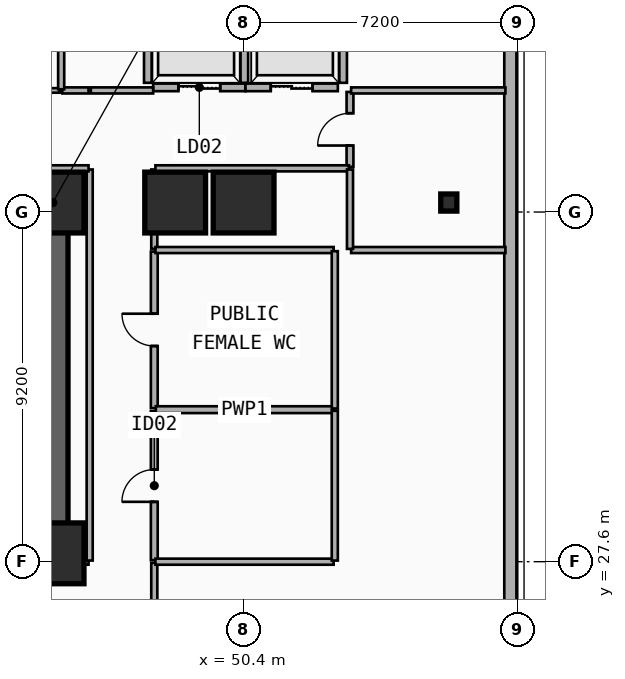
"""IFC4 building model, lengths in metres.
Left out: names, types, materials, properties, quantities, classifications, styles, units other than length and angle.
Written with IfcOpenShell. Run it as: python <this file> out.ifc"""

import sys

from ifc_helpers import new_model, si_unit, direction, frame, frame_2d, origin, origin_2d, place, context, subcontext, project, spatial, rectangle, i_section, extrude, element, fill, save


model = new_model("IFC4")
c1 = context("Model", 3, precision=1e-05, world=origin(), true_north=direction((0.0, 1.0)))
c2 = subcontext(c1, "Body", "Model", "MODEL_VIEW")
j1 = project(units=[si_unit("LENGTHUNIT", "METRE"), si_unit("PLANEANGLEUNIT", "RADIAN")], contexts=[c1])
p1 = place(None, origin())
s1 = spatial("IfcSite", under=j1, at=p1, CompositionType="ELEMENT")
p2 = place(p1, origin())
s2 = spatial("IfcBuilding", under=s1, at=p2, CompositionType="ELEMENT")
p3 = place(p2, frame((0.0, 0.0, 5.4)))
s3 = spatial("IfcBuildingStorey", under=s2, at=p3, CompositionType="ELEMENT", Elevation=5.4)
p4 = place(p3, frame((12.15, 37.05, 0.0), z_axis=(0.0, 0.0, 1.0), x_axis=(1.0, 0.0, 0.0)))
e1 = element("IfcWall", 1, at=p4, inside=s3, PredefinedType="SHEAR", context=c2, shape_type="SweptSolid", body=[
    extrude(rectangle(XDim=33.23, YDim=0.8, at=frame_2d((16.615, 0.0))), origin(), (0.0, 0.0, 1.0), 5.0),
])
p5 = place(p3, frame((45.38, 27.82, 0.0), z_axis=(0.0, 0.0, 1.0), x_axis=(-1.0, 0.0, 0.0)))
e2 = element("IfcWall", 2, at=p5, inside=s3, PredefinedType="SHEAR", context=c2, shape_type="SweptSolid", body=[
    extrude(rectangle(XDim=12.23, YDim=0.8, at=frame_2d((6.115, 0.0))), origin(), (0.0, 0.0, 1.0), 5.0),
])
p6 = place(p5, frame((9.93, 0.0, 0.0)))
e3 = element("IfcOpeningElement", 3, at=p6, cuts=e2, PredefinedType="OPENING", context=c2, shape_type="SweptSolid", body=[
    extrude(rectangle(XDim=1.1, YDim=2.15, at=frame_2d((0.55, 1.075))), frame((0.0, 0.41, 0.0), z_axis=(0.0, -1.0, 0.0), x_axis=(1.0, 0.0, 0.0)), (0.0, 0.0, 1.0), 0.82),
])
p7 = place(p5, frame((6.23, 0.0, 0.0)))
e4 = element("IfcOpeningElement", 4, at=p7, cuts=e2, PredefinedType="OPENING", context=c2, shape_type="SweptSolid", body=[
    extrude(rectangle(XDim=1.1, YDim=2.15, at=frame_2d((0.55, 1.075))), frame((0.0, 0.41, 0.0), z_axis=(0.0, -1.0, 0.0), x_axis=(1.0, 0.0, 0.0)), (0.0, 0.0, 1.0), 0.82),
])
p8 = place(p3, frame((45.38, 28.22, 0.0), z_axis=(0.0, 0.0, 1.0), x_axis=(0.0, 1.0, 0.0)))
e5 = element("IfcWall", 5, at=p8, inside=s3, PredefinedType="SHEAR", context=c2, shape_type="SweptSolid", body=[
    extrude(rectangle(XDim=8.43, YDim=0.8, at=frame_2d((4.215, 0.0))), origin(), (0.0, 0.0, 1.0), 5.0),
])
for number, where, z_axis, x_axis in (
    (6, (45.4, 27.82, 0.0), (0.0, 0.0, 1.0), (1.0, 0.0, 0.0)),
    (7, (45.4, 37.05, 0.0), (0.0, 0.0, 1.0), (1.0, 0.0, 0.0)),
    (8, (48.6, 37.05, 0.0), (0.0, 0.0, 1.0), (1.0, 0.0, 0.0)),
    (9, (50.4, 37.05, 0.0), (0.0, 0.0, 1.0), (1.0, 0.0, 0.0)),
):
    element("IfcColumn", number, at=place(p3, frame(where, z_axis=z_axis, x_axis=x_axis)), inside=s3, PredefinedType="COLUMN", context=c2, shape_type="SweptSolid", body=[
        extrude(rectangle(XDim=1.6, YDim=1.6, at=origin_2d()), origin(), (0.0, 0.0, 1.0), 5.0),
    ])
p9 = place(p3, frame((55.8, 37.05, 0.0), z_axis=(0.0, 0.0, 1.0), x_axis=(1.0, 0.0, 0.0)))
e10 = element("IfcColumn", 10, at=p9, inside=s3, PredefinedType="COLUMN", context=c2, shape_type="SweptSolid", body=[
    extrude(i_section(OverallWidth=0.424, OverallDepth=0.45, WebThickness=0.041, FlangeThickness=0.065, FilletRadius=0.015, at=origin_2d()), origin(), (0.0, 0.0, 1.0), 5.0),
])
p10 = place(p3, frame((57.42, 41.6, 0.0), z_axis=(0.0, 0.0, 1.0), x_axis=(0.0, -1.0, 0.0)))
e11 = element("IfcWall", 11, at=p10, inside=s3, PredefinedType="SOLIDWALL", context=c2, shape_type="SweptSolid", body=[
    extrude(rectangle(XDim=34.4, YDim=0.32, at=frame_2d((17.2, 0.0))), origin(), (0.0, 0.0, 1.0), 4.7),
])
p11 = place(p10, frame((20.727, 0.0, 0.9)))
e12 = element("IfcOpeningElement", 12, at=p11, cuts=e11, PredefinedType="OPENING", context=c2, shape_type="SweptSolid", body=[
    extrude(rectangle(XDim=2.4, YDim=1.8, at=frame_2d((1.2, 0.9))), frame((0.0, 0.17, 0.0), z_axis=(0.0, -1.0, 0.0), x_axis=(1.0, 0.0, 0.0)), (0.0, 0.0, 1.0), 0.34),
])
p12 = place(p10, frame((27.403, 0.0, 0.9)))
e13 = element("IfcOpeningElement", 13, at=p12, cuts=e11, PredefinedType="OPENING", context=c2, shape_type="SweptSolid", body=[
    extrude(rectangle(XDim=2.4, YDim=1.8, at=frame_2d((1.2, 0.9))), frame((0.0, 0.17, 0.0), z_axis=(0.0, -1.0, 0.0), x_axis=(1.0, 0.0, 0.0)), (0.0, 0.0, 1.0), 0.34),
])
p13 = place(p3, frame((48.02, 40.08, 0.0), z_axis=(0.0, 0.0, 1.0), x_axis=(1.0, 0.0, 0.0)))
e14 = element("IfcWall", 14, at=p13, inside=s3, PredefinedType="PARTITIONING", context=c2, shape_type="SweptSolid", body=[
    extrude(rectangle(XDim=2.43, YDim=0.2, at=frame_2d((1.215, 0.0))), origin(), (0.0, 0.0, 1.0), 4.7),
])
p14 = place(p13, frame((0.665, 0.0, 0.0)))
e15 = element("IfcOpeningElement", 15, at=p14, cuts=e14, PredefinedType="OPENING", context=c2, shape_type="SweptSolid", body=[
    extrude(rectangle(XDim=1.1, YDim=2.15, at=frame_2d((0.55, 1.075))), frame((0.0, 0.11, 0.0), z_axis=(0.0, -1.0, 0.0), x_axis=(1.0, 0.0, 0.0)), (0.0, 0.0, 1.0), 0.22),
])
for number, where, z_axis, x_axis in (
    (16, (47.88, 40.2, 0.0), (0.0, 0.0, 1.0), (0.0, 1.0, 0.0)),
    (17, (50.42, 40.2, 0.0), (0.0, 0.0, 1.0), (0.0, 1.0, 0.0)),
):
    element("IfcWall", number, at=place(p3, frame(where, z_axis=z_axis, x_axis=x_axis)), inside=s3, PredefinedType="PARTITIONING", context=c2, shape_type="SweptSolid", body=[
        extrude(rectangle(XDim=2.6, YDim=0.2, at=frame_2d((1.3, 0.0))), origin(), (0.0, 0.0, 1.0), 4.7),
    ])
p15 = place(p3, frame((50.45, 40.08, 0.0), z_axis=(0.0, 0.0, 1.0), x_axis=(1.0, 0.0, 0.0)))
e18 = element("IfcWall", 18, at=p15, inside=s3, PredefinedType="PARTITIONING", context=c2, shape_type="SweptSolid", body=[
    extrude(rectangle(XDim=2.43, YDim=0.2, at=frame_2d((1.215, 0.0))), origin(), (0.0, 0.0, 1.0), 4.7),
])
p16 = place(p15, frame((0.665, 0.0, 0.0)))
e19 = element("IfcOpeningElement", 19, at=p16, cuts=e18, PredefinedType="OPENING", context=c2, shape_type="SweptSolid", body=[
    extrude(rectangle(XDim=1.1, YDim=2.15, at=frame_2d((0.55, 1.075))), frame((0.0, 0.11, 0.0), z_axis=(0.0, -1.0, 0.0), x_axis=(1.0, 0.0, 0.0)), (0.0, 0.0, 1.0), 0.22),
])
p17 = place(p3, frame((53.02, 40.2, 0.0), z_axis=(0.0, 0.0, 1.0), x_axis=(0.0, 1.0, 0.0)))
e20 = element("IfcWall", 20, at=p17, inside=s3, PredefinedType="PARTITIONING", context=c2, shape_type="SweptSolid", body=[
    extrude(rectangle(XDim=2.6, YDim=0.2, at=frame_2d((1.3, 0.0))), origin(), (0.0, 0.0, 1.0), 4.7),
])
p18 = place(p3, frame((48.05, 27.64, 0.0), z_axis=(0.0, 0.0, 1.0), x_axis=(0.0, 1.0, 0.0)))
e21 = element("IfcWall", 21, at=p18, inside=s3, PredefinedType="PLUMBINGWALL", context=c2, shape_type="SweptSolid", body=[
    extrude(rectangle(XDim=3.92, YDim=0.18, at=frame_2d((1.96, 0.0))), origin(), (0.0, 0.0, 1.0), 4.7),
])
p19 = place(p18, frame((1.535, 0.0, 0.0)))
e22 = element("IfcOpeningElement", 22, at=p19, cuts=e21, PredefinedType="OPENING", context=c2, shape_type="SweptSolid", body=[
    extrude(rectangle(XDim=0.85, YDim=2.1, at=frame_2d((0.425, 1.05))), frame((0.0, 0.1, 0.0), z_axis=(0.0, -1.0, 0.0), x_axis=(1.0, 0.0, 0.0)), (0.0, 0.0, 1.0), 0.2),
])
p20 = place(p3, frame((48.05, 31.64, 0.0), z_axis=(0.0, 0.0, 1.0), x_axis=(0.0, 1.0, 0.0)))
e23 = element("IfcWall", 23, at=p20, inside=s3, PredefinedType="PLUMBINGWALL", context=c2, shape_type="SweptSolid", body=[
    extrude(rectangle(XDim=4.12, YDim=0.18, at=frame_2d((2.06, 0.0))), origin(), (0.0, 0.0, 1.0), 4.7),
])
p21 = place(p20, frame((1.635, 0.0, 0.0)))
e24 = element("IfcOpeningElement", 24, at=p21, cuts=e23, PredefinedType="OPENING", context=c2, shape_type="SweptSolid", body=[
    extrude(rectangle(XDim=0.85, YDim=2.1, at=frame_2d((0.425, 1.05))), frame((0.0, 0.1, 0.0), z_axis=(0.0, -1.0, 0.0), x_axis=(1.0, 0.0, 0.0)), (0.0, 0.0, 1.0), 0.2),
])
p22 = place(p3, frame((12.04, 40.0, 0.0), z_axis=(0.0, 0.0, 1.0), x_axis=(1.0, 0.0, 0.0)))
e25 = element("IfcWall", 25, at=p22, inside=s3, PredefinedType="PARTITIONING", context=c2, shape_type="SweptSolid", body=[
    extrude(rectangle(XDim=33.52, YDim=0.12, at=frame_2d((16.76, 0.0))), origin(), (0.0, 0.0, 1.0), 4.03),
])
p23 = place(p22, frame((16.31, 0.0, 0.0)))
e26 = element("IfcOpeningElement", 26, at=p23, cuts=e25, PredefinedType="OPENING", context=c2, shape_type="SweptSolid", body=[
    extrude(rectangle(XDim=0.9, YDim=2.1, at=frame_2d((0.45, 1.05))), frame((0.0, 0.07, 0.0), z_axis=(0.0, -1.0, 0.0), x_axis=(1.0, 0.0, 0.0)), (0.0, 0.0, 1.0), 0.14),
])
p24 = place(p3, frame((53.2, 37.99, 0.0), z_axis=(0.0, 0.0, 1.0), x_axis=(0.0, 1.0, 0.0)))
e27 = element("IfcWall", 27, at=p24, inside=s3, PredefinedType="PLUMBINGWALL", context=c2, shape_type="SweptSolid", body=[
    extrude(rectangle(XDim=1.97, YDim=0.18, at=frame_2d((0.985, 0.0))), origin(), (0.0, 0.0, 1.0), 4.7),
])
p25 = place(p24, frame((0.56, 0.0, 0.0)))
e28 = element("IfcOpeningElement", 28, at=p25, cuts=e27, PredefinedType="OPENING", context=c2, shape_type="SweptSolid", body=[
    extrude(rectangle(XDim=0.85, YDim=2.1, at=frame_2d((0.425, 1.05))), frame((0.0, 0.1, 0.0), z_axis=(0.0, -1.0, 0.0), x_axis=(1.0, 0.0, 0.0)), (0.0, 0.0, 1.0), 0.2),
])
p26 = place(p3, frame((48.09, 31.6, 0.0), z_axis=(0.0, 0.0, 1.0), x_axis=(1.0, 0.0, 0.0)))
e29 = element("IfcWall", 29, at=p26, inside=s3, PredefinedType="PLUMBINGWALL", context=c2, shape_type="SweptSolid", body=[
    extrude(rectangle(XDim=4.67, YDim=0.18, at=frame_2d((2.335, 0.0))), origin(), (0.0, 0.0, 1.0), 4.7),
])
p27 = place(p3, frame((45.41, 27.6, 0.0), z_axis=(0.0, 0.0, 1.0), x_axis=(1.0, 0.0, 0.0)))
e30 = element("IfcWall", 30, at=p27, inside=s3, PredefinedType="PARTITIONING", context=c2, shape_type="SweptSolid", body=[
    extrude(rectangle(XDim=0.91, YDim=0.16, at=frame_2d((0.455, 0.0))), origin(), (0.0, 0.0, 1.0), 3.672),
])
p28 = place(p3, frame((48.05, 25.48, 0.0), z_axis=(0.0, 0.0, 1.0), x_axis=(0.0, 1.0, 0.0)))
e31 = element("IfcWall", 31, at=p28, inside=s3, PredefinedType="PARTITIONING", context=c2, shape_type="SweptSolid", body=[
    extrude(rectangle(XDim=2.09, YDim=0.16, at=frame_2d((1.045, 0.0))), origin(), (0.0, 0.0, 1.0), 4.7),
])
p29 = place(p3, frame((46.38, 40.0, 0.0), z_axis=(0.0, 0.0, 1.0), x_axis=(1.0, 0.0, 0.0)))
e32 = element("IfcWall", 32, at=p29, inside=s3, PredefinedType="PARTITIONING", context=c2, shape_type="SweptSolid", body=[
    extrude(rectangle(XDim=1.64, YDim=0.16, at=frame_2d((0.82, 0.0))), origin(), (0.0, 0.0, 1.0), 4.7),
])
p30 = place(p3, frame((46.35, 27.63, 0.0), z_axis=(0.0, 0.0, 1.0), x_axis=(0.0, 1.0, 0.0)))
e33 = element("IfcWall", 33, at=p30, inside=s3, PredefinedType="PARTITIONING", context=c2, shape_type="SweptSolid", body=[
    extrude(rectangle(XDim=10.29, YDim=0.16, at=frame_2d((5.145, 0.0))), origin(), (0.0, 0.0, 1.0), 4.7),
])
p31 = place(p3, frame((48.05, 35.83, 0.0), z_axis=(0.0, 0.0, 1.0), x_axis=(0.0, 1.0, 0.0)))
e34 = element("IfcWall", 34, at=p31, inside=s3, PredefinedType="PARTITIONING", context=c2, shape_type="SweptSolid", body=[
    extrude(rectangle(XDim=2.09, YDim=0.16, at=frame_2d((1.045, 0.0))), origin(), (0.0, 0.0, 1.0), 4.7),
])
p32 = place(p3, frame((11.28, 37.95, 0.0), z_axis=(0.0, 0.0, 1.0), x_axis=(1.0, 0.0, 0.0)))
e35 = element("IfcWall", 35, at=p32, inside=s3, PredefinedType="PARTITIONING", context=c2, shape_type="SweptSolid", body=[
    extrude(rectangle(XDim=35.04, YDim=0.16, at=frame_2d((17.52, 0.0))), origin(), (0.0, 0.0, 1.0), 4.03),
])
p33 = place(p3, frame((45.63, 40.0, 0.0), z_axis=(0.0, 0.0, 1.0), x_axis=(1.0, 0.0, 0.0)))
e36 = element("IfcWall", 36, at=p33, inside=s3, PredefinedType="PARTITIONING", context=c2, shape_type="SweptSolid", body=[
    extrude(rectangle(XDim=0.69, YDim=0.16, at=frame_2d((0.345, 0.0))), origin(), (0.0, 0.0, 1.0), 4.03),
])
p34 = place(p3, frame((48.08, 37.95, 0.0), z_axis=(0.0, 0.0, 1.0), x_axis=(1.0, 0.0, 0.0)))
e37 = element("IfcWall", 37, at=p34, inside=s3, PredefinedType="PARTITIONING", context=c2, shape_type="SweptSolid", body=[
    extrude(rectangle(XDim=5.09, YDim=0.16, at=frame_2d((2.545, 0.0))), origin(), (0.0, 0.0, 1.0), 4.7),
])
p35 = place(p3, frame((48.08, 27.6, 0.0), z_axis=(0.0, 0.0, 1.0), x_axis=(1.0, 0.0, 0.0)))
e38 = element("IfcWall", 38, at=p35, inside=s3, PredefinedType="PARTITIONING", context=c2, shape_type="SweptSolid", body=[
    extrude(rectangle(XDim=4.69, YDim=0.16, at=frame_2d((2.345, 0.0))), origin(), (0.0, 0.0, 1.0), 4.7),
])
p36 = place(p3, frame((52.8, 27.63, 0.0), z_axis=(0.0, 0.0, 1.0), x_axis=(0.0, 1.0, 0.0)))
e39 = element("IfcWall", 39, at=p36, inside=s3, PredefinedType="PARTITIONING", context=c2, shape_type="SweptSolid", body=[
    extrude(rectangle(XDim=3.94, YDim=0.16, at=frame_2d((1.97, 0.0))), origin(), (0.0, 0.0, 1.0), 4.7),
])
p37 = place(p3, frame((48.08, 35.8, 0.0), z_axis=(0.0, 0.0, 1.0), x_axis=(1.0, 0.0, 0.0)))
e40 = element("IfcWall", 40, at=p37, inside=s3, PredefinedType="PARTITIONING", context=c2, shape_type="SweptSolid", body=[
    extrude(rectangle(XDim=4.69, YDim=0.16, at=frame_2d((2.345, 0.0))), origin(), (0.0, 0.0, 1.0), 4.7),
])
p38 = place(p3, frame((52.8, 31.63, 0.0), z_axis=(0.0, 0.0, 1.0), x_axis=(0.0, 1.0, 0.0)))
e41 = element("IfcWall", 41, at=p38, inside=s3, PredefinedType="PARTITIONING", context=c2, shape_type="SweptSolid", body=[
    extrude(rectangle(XDim=4.14, YDim=0.16, at=frame_2d((2.07, 0.0))), origin(), (0.0, 0.0, 1.0), 4.7),
])
for number, where, z_axis, x_axis in (
    (42, (53.23, 35.8, 0.0), (0.0, 0.0, 1.0), (1.0, 0.0, 0.0)),
    (43, (53.23, 40.0, 0.0), (0.0, 0.0, 1.0), (1.0, 0.0, 0.0)),
):
    element("IfcWall", number, at=place(p3, frame(where, z_axis=z_axis, x_axis=x_axis)), inside=s3, PredefinedType="PARTITIONING", context=c2, shape_type="SweptSolid", body=[
        extrude(rectangle(XDim=4.06, YDim=0.16, at=frame_2d((2.03, 0.0))), origin(), (0.0, 0.0, 1.0), 4.7),
    ])
p39 = place(p3, frame((53.2, 35.83, 0.0), z_axis=(0.0, 0.0, 1.0), x_axis=(0.0, 1.0, 0.0)))
e44 = element("IfcWall", 44, at=p39, inside=s3, PredefinedType="PARTITIONING", context=c2, shape_type="SweptSolid", body=[
    extrude(rectangle(XDim=2.09, YDim=0.16, at=frame_2d((1.045, 0.0))), origin(), (0.0, 0.0, 1.0), 4.7),
])
p40 = place(p3, frame((45.6, 40.03, 0.0), z_axis=(0.0, 0.0, 1.0), x_axis=(0.0, 1.0, 0.0)))
e45 = element("IfcWall", 45, at=p40, inside=s3, PredefinedType="PARTITIONING", context=c2, shape_type="SweptSolid", body=[
    extrude(rectangle(XDim=4.86, YDim=0.16, at=frame_2d((2.43, 0.0))), origin(), (0.0, 0.0, 1.0), 4.03),
])
p41 = place(p14, origin())
e46 = element("IfcDoor", 46, at=p41, inside=s3, OperationType="DOUBLE_DOOR_SLIDING", PredefinedType="DOOR", context=c2, shape_type="SweptSolid", body=[
    extrude(rectangle(XDim=1.1, YDim=2.15, at=frame_2d((0.55, 1.075))), frame((0.0, 0.025, 0.0), z_axis=(0.0, -1.0, 0.0), x_axis=(1.0, 0.0, 0.0)), (0.0, 0.0, 1.0), 0.05),
])
fill(e15, e46)
p42 = place(p16, origin())
e47 = element("IfcDoor", 47, at=p42, inside=s3, OperationType="DOUBLE_DOOR_SLIDING", PredefinedType="DOOR", context=c2, shape_type="SweptSolid", body=[
    extrude(rectangle(XDim=1.1, YDim=2.15, at=frame_2d((0.55, 1.075))), frame((0.0, 0.025, 0.0), z_axis=(0.0, -1.0, 0.0), x_axis=(1.0, 0.0, 0.0)), (0.0, 0.0, 1.0), 0.05),
])
fill(e19, e47)
p43 = place(p19, origin())
e48 = element("IfcDoor", 48, at=p43, inside=s3, OperationType="SINGLE_SWING_LEFT", PredefinedType="DOOR", context=c2, shape_type="SweptSolid", body=[
    extrude(rectangle(XDim=0.85, YDim=2.1, at=frame_2d((0.425, 1.05))), frame((0.0, 0.025, 0.0), z_axis=(0.0, -1.0, 0.0), x_axis=(1.0, 0.0, 0.0)), (0.0, 0.0, 1.0), 0.05),
])
fill(e22, e48)
p44 = place(p21, origin())
e49 = element("IfcDoor", 49, at=p44, inside=s3, OperationType="SINGLE_SWING_RIGHT", PredefinedType="DOOR", context=c2, shape_type="SweptSolid", body=[
    extrude(rectangle(XDim=0.85, YDim=2.1, at=frame_2d((0.425, 1.05))), frame((0.0, 0.025, 0.0), z_axis=(0.0, -1.0, 0.0), x_axis=(1.0, 0.0, 0.0)), (0.0, 0.0, 1.0), 0.05),
])
fill(e24, e49)
p45 = place(p25, origin())
e50 = element("IfcDoor", 50, at=p45, inside=s3, OperationType="SINGLE_SWING_LEFT", PredefinedType="DOOR", context=c2, shape_type="SweptSolid", body=[
    extrude(rectangle(XDim=0.85, YDim=2.1, at=frame_2d((0.425, 1.05))), frame((0.0, 0.025, 0.0), z_axis=(0.0, -1.0, 0.0), x_axis=(1.0, 0.0, 0.0)), (0.0, 0.0, 1.0), 0.05),
])
fill(e28, e50)
save(model, sys.argv[1])
